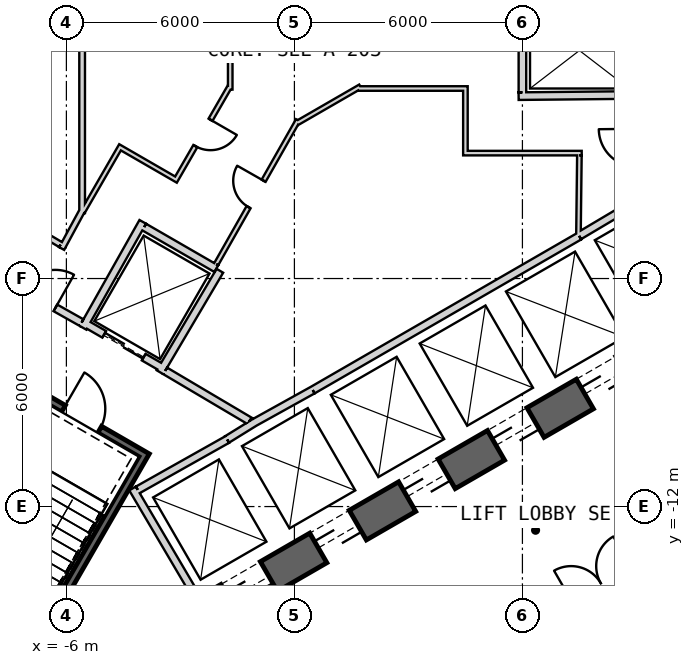
"""IFC4 building model, lengths in metres.
Left out: names, types, materials, properties, quantities, classifications, styles, units other than length and angle.
Written with IfcOpenShell. Run it as: python <this file> out.ifc"""

import sys

from ifc_helpers import new_model, si_unit, direction, frame, frame_2d, origin, place, context, subcontext, project, spatial, rectangle, extrude, element, fill, save


model = new_model("IFC4")
c1 = context("Model", 3, precision=1e-05, world=origin(), true_north=direction((0.0, 1.0)))
c2 = subcontext(c1, "Body", "Model", "MODEL_VIEW")
j1 = project(units=[si_unit("LENGTHUNIT", "METRE"), si_unit("PLANEANGLEUNIT", "RADIAN")], contexts=[c1])
p1 = place(None, origin())
s1 = spatial("IfcSite", under=j1, at=p1, CompositionType="ELEMENT")
p2 = place(p1, origin())
s2 = spatial("IfcBuilding", under=s1, at=p2, CompositionType="ELEMENT")
p3 = place(p2, origin())
s3 = spatial("IfcBuildingStorey", under=s2, at=p3, CompositionType="ELEMENT", Elevation=0.0)
p4 = place(p3, frame((-7.825, -17.97, 0.0), z_axis=(0.0, 0.0, 1.0), x_axis=(0.866028369851, 0.499994862586, 0.0)))
e1 = element("IfcWall", 1, at=p4, inside=s3, PredefinedType="SHEAR", context=c2, shape_type="SweptSolid", body=[
    extrude(rectangle(XDim=31.523, YDim=0.9, at=frame_2d((15.762, 0.0))), origin(), (0.0, 0.0, 1.0), 9.0),
])
p5 = place(p4, frame((7.062, 0.0, 0.0)))
e2 = element("IfcOpeningElement", 2, at=p5, cuts=e1, PredefinedType="OPENING", context=c2, shape_type="SweptSolid", body=[
    extrude(rectangle(XDim=1.2, YDim=2.4, at=frame_2d((0.6, 1.2))), frame((0.0, 0.46, 0.0), z_axis=(0.0, -1.0, 0.0), x_axis=(1.0, 0.0, 0.0)), (0.0, 0.0, 1.0), 0.92),
])
p6 = place(p4, frame((9.762, 0.0, 0.0)))
e3 = element("IfcOpeningElement", 3, at=p6, cuts=e1, PredefinedType="OPENING", context=c2, shape_type="SweptSolid", body=[
    extrude(rectangle(XDim=1.2, YDim=2.4, at=frame_2d((0.6, 1.2))), frame((0.0, 0.46, 0.0), z_axis=(0.0, -1.0, 0.0), x_axis=(1.0, 0.0, 0.0)), (0.0, 0.0, 1.0), 0.92),
])
p7 = place(p4, frame((12.462, 0.0, 0.0)))
e4 = element("IfcOpeningElement", 4, at=p7, cuts=e1, PredefinedType="OPENING", context=c2, shape_type="SweptSolid", body=[
    extrude(rectangle(XDim=1.2, YDim=2.4, at=frame_2d((0.6, 1.2))), frame((0.0, 0.46, 0.0), z_axis=(0.0, -1.0, 0.0), x_axis=(1.0, 0.0, 0.0)), (0.0, 0.0, 1.0), 0.92),
])
p8 = place(p4, frame((15.162, 0.0, 0.0)))
e5 = element("IfcOpeningElement", 5, at=p8, cuts=e1, PredefinedType="OPENING", context=c2, shape_type="SweptSolid", body=[
    extrude(rectangle(XDim=1.2, YDim=2.4, at=frame_2d((0.6, 1.2))), frame((0.0, 0.46, 0.0), z_axis=(0.0, -1.0, 0.0), x_axis=(1.0, 0.0, 0.0)), (0.0, 0.0, 1.0), 0.92),
])
p9 = place(p4, frame((17.862, 0.0, 0.0)))
e6 = element("IfcOpeningElement", 6, at=p9, cuts=e1, PredefinedType="OPENING", context=c2, shape_type="SweptSolid", body=[
    extrude(rectangle(XDim=1.2, YDim=2.4, at=frame_2d((0.6, 1.2))), frame((0.0, 0.46, 0.0), z_axis=(0.0, -1.0, 0.0), x_axis=(1.0, 0.0, 0.0)), (0.0, 0.0, 1.0), 0.92),
])
p10 = place(p4, frame((20.562, 0.0, 0.0)))
e7 = element("IfcOpeningElement", 7, at=p10, cuts=e1, PredefinedType="OPENING", context=c2, shape_type="SweptSolid", body=[
    extrude(rectangle(XDim=1.2, YDim=2.4, at=frame_2d((0.6, 1.2))), frame((0.0, 0.46, 0.0), z_axis=(0.0, -1.0, 0.0), x_axis=(1.0, 0.0, 0.0)), (0.0, 0.0, 1.0), 0.92),
])
p11 = place(p4, frame((26.712, 0.0, 0.0)))
e8 = element("IfcOpeningElement", 8, at=p11, cuts=e1, PredefinedType="OPENING", context=c2, shape_type="SweptSolid", body=[
    extrude(rectangle(XDim=1.2, YDim=2.4, at=frame_2d((0.6, 1.2))), frame((0.0, 0.46, 0.0), z_axis=(0.0, -1.0, 0.0), x_axis=(1.0, 0.0, 0.0)), (0.0, 0.0, 1.0), 0.92),
])
p12 = place(p4, frame((3.612, 0.0, 0.0)))
e9 = element("IfcOpeningElement", 9, at=p12, cuts=e1, PredefinedType="OPENING", context=c2, shape_type="SweptSolid", body=[
    extrude(rectangle(XDim=1.2, YDim=2.4, at=frame_2d((0.6, 1.2))), frame((0.0, 0.46, 0.0), z_axis=(0.0, -1.0, 0.0), x_axis=(1.0, 0.0, 0.0)), (0.0, 0.0, 1.0), 0.92),
])
p13 = place(p3, frame((0.483, -8.936, 0.0), z_axis=(0.0, 0.0, 1.0), x_axis=(0.866030989016, 0.499990325971, 0.0)))
e10 = element("IfcWall", 10, at=p13, inside=s3, PredefinedType="PLUMBINGWALL", context=c2, shape_type="SweptSolid", body=[
    extrude(rectangle(XDim=8.1, YDim=0.2, at=frame_2d((4.05, 0.0))), origin(), (0.0, 0.0, 1.0), 8.7),
])
p14 = place(p3, frame((7.493, -4.878, 0.0), z_axis=(0.0, 0.0, 1.0), x_axis=(0.859981807212, 0.510324691999, 0.0)))
e11 = element("IfcWall", 11, at=p14, inside=s3, PredefinedType="PLUMBINGWALL", context=c2, shape_type="SweptSolid", body=[
    extrude(rectangle(XDim=1.845, YDim=0.2, at=frame_2d((0.922, 0.0))), origin(), (0.0, 0.0, 1.0), 8.7),
])
p15 = place(p3, frame((-2.558, -14.409, 0.0), z_axis=(0.0, 0.0, 1.0), x_axis=(-0.507997497166, 0.861358544901, 0.0)))
e12 = element("IfcWall", 12, at=p15, inside=s3, PredefinedType="PLUMBINGWALL", context=c2, shape_type="SweptSolid", body=[
    extrude(rectangle(XDim=3.35, YDim=0.2, at=frame_2d((1.675, 0.0))), origin(), (0.0, 0.0, 1.0), 8.7),
])
p16 = place(p3, frame((-1.769, -10.237, 0.0), z_axis=(0.0, 0.0, 1.0), x_axis=(-0.871534483978, -0.490334215854, 0.0)))
e13 = element("IfcWall", 13, at=p16, inside=s3, PredefinedType="PLUMBINGWALL", context=c2, shape_type="SweptSolid", body=[
    extrude(rectangle(XDim=2.7, YDim=0.2, at=frame_2d((1.35, 0.0))), origin(), (0.0, 0.0, 1.0), 8.7),
])
p17 = place(p3, frame((-1.024, -9.771, 0.0), z_axis=(0.0, 0.0, 1.0), x_axis=(-0.850348075135, -0.526220629693, 0.0)))
e14 = element("IfcWall", 14, at=p17, inside=s3, PredefinedType="PLUMBINGWALL", context=c2, shape_type="SweptSolid", body=[
    extrude(rectangle(XDim=0.878, YDim=0.2, at=frame_2d((0.439, 0.0))), origin(), (0.0, 0.0, 1.0), 8.7),
])
p18 = place(p3, frame((-1.13, -9.831, 0.0), z_axis=(0.0, 0.0, 1.0), x_axis=(0.874269620932, 0.485440655401, 0.0)))
e15 = element("IfcWall", 15, at=p18, inside=s3, PredefinedType="PLUMBINGWALL", context=c2, shape_type="SweptSolid", body=[
    extrude(rectangle(XDim=1.845, YDim=0.2, at=frame_2d((0.922, 0.0))), origin(), (0.0, 0.0, 1.0), 8.7),
])
p19 = place(p3, frame((5.9, -1.201, 0.0), z_axis=(0.0, 0.0, 1.0), x_axis=(0.999950064753, 0.009993397809, 0.0)))
e16 = element("IfcWall", 16, at=p19, inside=s3, PredefinedType="PLUMBINGWALL", context=c2, shape_type="SweptSolid", body=[
    extrude(rectangle(XDim=3.2, YDim=0.2, at=frame_2d((1.6, 0.0))), origin(), (0.0, 0.0, 1.0), 8.7),
])
p20 = place(p3, frame((6.0, -1.1, 0.0), z_axis=(0.0, 0.0, 1.0), x_axis=(0.0, 1.0, 0.0)))
e17 = element("IfcWall", 17, at=p20, inside=s3, PredefinedType="PLUMBINGWALL", context=c2, shape_type="SweptSolid", body=[
    extrude(rectangle(XDim=2.205, YDim=0.2, at=frame_2d((1.102, 0.0))), origin(), (0.0, 0.0, 1.0), 8.7),
])
p21 = place(p3, frame((-3.905, -10.563, -0.4), z_axis=(0.0, 0.0, 1.0), x_axis=(-0.500012932018, -0.866017937352, 0.0)))
e18 = element("IfcWall", 18, at=p21, inside=s3, PredefinedType="SHEAR", context=c2, shape_type="SweptSolid", body=[
    extrude(rectangle(XDim=8.1, YDim=0.2, at=frame_2d((4.05, 0.0))), origin(), (0.0, 0.0, 1.0), 9.1),
])
p22 = place(p3, frame((-4.041, -10.599, -0.4), z_axis=(0.0, 0.0, 1.0), x_axis=(-0.866047807691, 0.499961193289, 0.0)))
e19 = element("IfcWall", 19, at=p22, inside=s3, PredefinedType="SHEAR", context=c2, shape_type="SweptSolid", body=[
    extrude(rectangle(XDim=3.6, YDim=0.2, at=frame_2d((1.8, 0.0))), origin(), (0.0, 0.0, 1.0), 9.1),
])
p23 = place(p22, frame((1.25, 0.0, 0.4)))
e20 = element("IfcOpeningElement", 20, at=p23, cuts=e19, PredefinedType="OPENING", context=c2, shape_type="SweptSolid", body=[
    extrude(rectangle(XDim=1.1, YDim=2.1, at=frame_2d((0.55, 1.05))), frame((0.0, 0.11, 0.0), z_axis=(0.0, -1.0, 0.0), x_axis=(1.0, 0.0, 0.0)), (0.0, 0.0, 1.0), 0.22),
])
p24 = place(p3, frame((-3.446, -8.368, 0.0), z_axis=(0.0, 0.0, 1.0), x_axis=(-0.866024647952, 0.500001309137, 0.0)))
e21 = element("IfcWall", 21, at=p24, inside=s3, PredefinedType="PLUMBINGWALL", context=c2, shape_type="SweptSolid", body=[
    extrude(rectangle(XDim=2.4, YDim=0.2, at=frame_2d((1.2, 0.0))), origin(), (0.0, 0.0, 1.0), 8.7),
])
p25 = place(p24, frame((0.6, 0.0, 0.0)))
e22 = element("IfcOpeningElement", 22, at=p25, cuts=e21, PredefinedType="OPENING", context=c2, shape_type="SweptSolid", body=[
    extrude(rectangle(XDim=1.2, YDim=2.4, at=frame_2d((0.6, 1.2))), frame((0.0, 0.11, 0.0), z_axis=(0.0, -1.0, 0.0), x_axis=(1.0, 0.0, 0.0)), (0.0, 0.0, 1.0), 0.22),
])
p26 = place(p3, frame((-1.961, -5.796, 0.0), z_axis=(0.0, 0.0, 1.0), x_axis=(-0.508647062354, -0.860975125052, 0.0)))
e23 = element("IfcWall", 23, at=p26, inside=s3, PredefinedType="PLUMBINGWALL", context=c2, shape_type="SweptSolid", body=[
    extrude(rectangle(XDim=3.1, YDim=0.2, at=frame_2d((1.55, 0.0))), origin(), (0.0, 0.0, 1.0), 8.7),
])
p27 = place(p3, frame((-3.99, -4.509, 0.0), z_axis=(0.0, 0.0, 1.0), x_axis=(-0.491358283181, -0.870957540612, 0.0)))
e24 = element("IfcWall", 24, at=p27, inside=s3, PredefinedType="PLUMBINGWALL", context=c2, shape_type="SweptSolid", body=[
    extrude(rectangle(XDim=3.2, YDim=0.2, at=frame_2d((1.6, 0.0))), origin(), (0.0, 0.0, 1.0), 8.7),
])
p28 = place(p3, frame((-3.953, -4.646, 0.0), z_axis=(0.0, 0.0, 1.0), x_axis=(0.866038900241, -0.499976622722, 0.0)))
e25 = element("IfcWall", 25, at=p28, inside=s3, PredefinedType="PLUMBINGWALL", context=c2, shape_type="SweptSolid", body=[
    extrude(rectangle(XDim=2.189, YDim=0.2, at=frame_2d((1.095, 0.0))), origin(), (0.0, 0.0, 1.0), 8.7),
])
p29 = place(p3, frame((-3.401, -8.43, 0.0), z_axis=(0.0, 0.0, 1.0), x_axis=(0.860615607571, -0.509255118781, 0.0)))
e26 = element("IfcWall", 26, at=p29, inside=s3, PredefinedType="PARTITIONING", context=c2, shape_type="SweptSolid", body=[
    extrude(rectangle(XDim=2.581, YDim=0.2, at=frame_2d((1.29, 0.0))), origin(), (0.0, 0.0, 1.0), 8.7),
])
p30 = place(p3, frame((-7.849, -5.894, 0.0), z_axis=(0.0, 0.0, 1.0), x_axis=(0.871363259478, -0.490638431059, 0.0)))
e27 = element("IfcWall", 27, at=p30, inside=s3, PredefinedType="PARTITIONING", context=c2, shape_type="SweptSolid", body=[
    extrude(rectangle(XDim=2.581, YDim=0.2, at=frame_2d((1.291, 0.0))), origin(), (0.0, 0.0, 1.0), 8.7),
])
p31 = place(p30, frame((0.791, 0.0, 0.0)))
e28 = element("IfcOpeningElement", 28, at=p31, cuts=e27, PredefinedType="OPENING", context=c2, shape_type="SweptSolid", body=[
    extrude(rectangle(XDim=1.0, YDim=2.1, at=frame_2d((0.5, 1.05))), frame((0.0, 0.11, 0.0), z_axis=(0.0, -1.0, 0.0), x_axis=(1.0, 0.0, 0.0)), (0.0, 0.0, 1.0), 0.22),
])
p32 = place(p3, frame((0.094, -1.836, 0.0), z_axis=(0.0, 0.0, 1.0), x_axis=(-0.494097972448, -0.869406230495, 0.0)))
e29 = element("IfcWall", 29, at=p32, inside=s3, PredefinedType="PARTITIONING", context=c2, shape_type="SweptSolid", body=[
    extrude(rectangle(XDim=4.357, YDim=0.12, at=frame_2d((2.179, 0.0))), origin(), (0.0, 0.0, 1.0), 8.7),
])
p33 = place(p32, frame((1.83, 0.0, 0.0)))
e30 = element("IfcOpeningElement", 30, at=p33, cuts=e29, PredefinedType="OPENING", context=c2, shape_type="SweptSolid", body=[
    extrude(rectangle(XDim=0.8, YDim=2.1, at=frame_2d((0.4, 1.05))), frame((0.0, 0.07, 0.0), z_axis=(0.0, -1.0, 0.0), x_axis=(1.0, 0.0, 0.0)), (0.0, 0.0, 1.0), 0.14),
])
p34 = place(p3, frame((1.735, -0.948, 0.0), z_axis=(0.0, 0.0, 1.0), x_axis=(-0.866021702275, -0.500006411147, 0.0)))
e31 = element("IfcWall", 31, at=p34, inside=s3, PredefinedType="PARTITIONING", context=c2, shape_type="SweptSolid", body=[
    extrude(rectangle(XDim=1.935, YDim=0.12, at=frame_2d((0.968, 0.0))), origin(), (0.0, 0.0, 1.0), 8.7),
])
p35 = place(p3, frame((4.56, -1.0, 0.0), z_axis=(0.0, 0.0, 1.0), x_axis=(-1.0, 0.0, 0.0)))
e32 = element("IfcWall", 32, at=p35, inside=s3, PredefinedType="PARTITIONING", context=c2, shape_type="SweptSolid", body=[
    extrude(rectangle(XDim=2.896, YDim=0.12, at=frame_2d((1.448, 0.0))), origin(), (0.0, 0.0, 1.0), 8.7),
])
p36 = place(p3, frame((4.5, -2.76, 0.0), z_axis=(0.0, 0.0, 1.0), x_axis=(0.0, 1.0, 0.0)))
e33 = element("IfcWall", 33, at=p36, inside=s3, PredefinedType="PARTITIONING", context=c2, shape_type="SweptSolid", body=[
    extrude(rectangle(XDim=1.7, YDim=0.12, at=frame_2d((0.85, 0.0))), origin(), (0.0, 0.0, 1.0), 8.7),
])
p37 = place(p3, frame((7.56, -2.7, 0.0), z_axis=(0.0, 0.0, 1.0), x_axis=(-1.0, 0.0, 0.0)))
e34 = element("IfcWall", 34, at=p37, inside=s3, PredefinedType="PARTITIONING", context=c2, shape_type="SweptSolid", body=[
    extrude(rectangle(XDim=3.0, YDim=0.12, at=frame_2d((1.5, 0.0))), origin(), (0.0, 0.0, 1.0), 8.7),
])
p38 = place(p3, frame((7.475, -4.865, 0.0), z_axis=(0.0, 0.0, 1.0), x_axis=(0.011716133148, 0.999931363757, 0.0)))
e35 = element("IfcWall", 35, at=p38, inside=s3, PredefinedType="PARTITIONING", context=c2, shape_type="SweptSolid", body=[
    extrude(rectangle(XDim=2.105, YDim=0.12, at=frame_2d((1.052, 0.0))), origin(), (0.0, 0.0, 1.0), 8.7),
])
p39 = place(p3, frame((-5.586, -4.275, 0.0), z_axis=(0.0, 0.0, 1.0), x_axis=(0.0, 1.0, 0.0)))
e36 = element("IfcWall", 36, at=p39, inside=s3, PredefinedType="PLUMBINGWALL", context=c2, shape_type="SweptSolid", body=[
    extrude(rectangle(XDim=8.549, YDim=0.15, at=frame_2d((4.275, 0.0))), origin(), (0.0, 0.0, 1.0), 8.7),
])
p40 = place(p3, frame((-6.124, -5.211, 0.0), z_axis=(0.0, 0.0, 1.0), x_axis=(0.476228984866, 0.879321303036, 0.0)))
e37 = element("IfcWall", 37, at=p40, inside=s3, PredefinedType="PLUMBINGWALL", context=c2, shape_type="SweptSolid", body=[
    extrude(rectangle(XDim=1.162, YDim=0.15, at=frame_2d((0.581, 0.0))), origin(), (0.0, 0.0, 1.0), 8.7),
])
p41 = place(p3, frame((-7.95, -4.041, 0.0), z_axis=(0.0, 0.0, 1.0), x_axis=(0.860090281069, -0.510141851263, 0.0)))
e38 = element("IfcWall", 38, at=p41, inside=s3, PredefinedType="PLUMBINGWALL", context=c2, shape_type="SweptSolid", body=[
    extrude(rectangle(XDim=2.089, YDim=0.15, at=frame_2d((1.045, 0.0))), origin(), (0.0, 0.0, 1.0), 8.7),
])
p42 = place(p3, frame((-1.689, -1.029, 0.0), z_axis=(0.0, 0.0, 1.0), x_axis=(0.0, 1.0, 0.0)))
e39 = element("IfcWall", 39, at=p42, inside=s3, PredefinedType="PARTITIONING", context=c2, shape_type="SweptSolid", body=[
    extrude(rectangle(XDim=1.935, YDim=0.12, at=frame_2d((0.968, 0.0))), origin(), (0.0, 0.0, 1.0), 8.7),
])
p43 = place(p3, frame((-3.146, -3.449, 0.0), z_axis=(0.0, 0.0, 1.0), x_axis=(0.500028961621, 0.866008682139, 0.0)))
e40 = element("IfcWall", 40, at=p43, inside=s3, PredefinedType="PARTITIONING", context=c2, shape_type="SweptSolid", body=[
    extrude(rectangle(XDim=2.896, YDim=0.12, at=frame_2d((1.448, 0.0))), origin(), (0.0, 0.0, 1.0), 8.7),
])
p44 = place(p43, frame((1.078, 0.0, 0.0)))
e41 = element("IfcOpeningElement", 41, at=p44, cuts=e40, PredefinedType="OPENING", context=c2, shape_type="SweptSolid", body=[
    extrude(rectangle(XDim=0.8, YDim=2.1, at=frame_2d((0.4, 1.05))), frame((0.0, 0.07, 0.0), z_axis=(0.0, -1.0, 0.0), x_axis=(1.0, 0.0, 0.0)), (0.0, 0.0, 1.0), 0.14),
])
p45 = place(p3, frame((-4.64, -2.517, 0.0), z_axis=(0.0, 0.0, 1.0), x_axis=(0.865989465428, -0.500062241894, 0.0)))
e42 = element("IfcWall", 42, at=p45, inside=s3, PredefinedType="PARTITIONING", context=c2, shape_type="SweptSolid", body=[
    extrude(rectangle(XDim=1.7, YDim=0.12, at=frame_2d((0.85, 0.0))), origin(), (0.0, 0.0, 1.0), 8.7),
])
p46 = place(p3, frame((-5.571, -4.249, 0.0), z_axis=(0.0, 0.0, 1.0), x_axis=(0.500081145431, 0.865978549379, 0.0)))
e43 = element("IfcWall", 43, at=p46, inside=s3, PredefinedType="PARTITIONING", context=c2, shape_type="SweptSolid", body=[
    extrude(rectangle(XDim=1.905, YDim=0.12, at=frame_2d((0.953, 0.0))), origin(), (0.0, 0.0, 1.0), 8.7),
])
p47 = place(p3, frame((-4.276, -21.14, 0.0), z_axis=(0.0, 0.0, 1.0), x_axis=(0.866026219638, 0.499998586897, 0.0)))
e44 = element("IfcWall", 44, at=p47, inside=s3, PredefinedType="PARTITIONING", context=c2, shape_type="SweptSolid", body=[
    extrude(rectangle(XDim=28.547, YDim=0.12, at=frame_2d((14.273, 0.0))), origin(), (0.0, 0.0, 1.0), 8.7),
])
p48 = place(p47, frame((20.947, 0.0, 0.0)))
e45 = element("IfcOpeningElement", 45, at=p48, cuts=e44, PredefinedType="OPENING", context=c2, shape_type="SweptSolid", body=[
    extrude(rectangle(XDim=1.8, YDim=2.1, at=frame_2d((0.9, 1.05))), frame((0.0, 0.07, 0.0), z_axis=(0.0, -1.0, 0.0), x_axis=(1.0, 0.0, 0.0)), (0.0, 0.0, 1.0), 0.14),
])
p49 = place(p47, frame((13.347, 0.0, 0.0)))
e46 = element("IfcOpeningElement", 46, at=p49, cuts=e44, PredefinedType="OPENING", context=c2, shape_type="SweptSolid", body=[
    extrude(rectangle(XDim=1.8, YDim=2.1, at=frame_2d((0.9, 1.05))), frame((0.0, 0.07, 0.0), z_axis=(0.0, -1.0, 0.0), x_axis=(1.0, 0.0, 0.0)), (0.0, 0.0, 1.0), 0.14),
])
p50 = place(p47, frame((5.747, 0.0, 0.0)))
e47 = element("IfcOpeningElement", 47, at=p50, cuts=e44, PredefinedType="OPENING", context=c2, shape_type="SweptSolid", body=[
    extrude(rectangle(XDim=1.8, YDim=2.1, at=frame_2d((0.9, 1.05))), frame((0.0, 0.07, 0.0), z_axis=(0.0, -1.0, 0.0), x_axis=(1.0, 0.0, 0.0)), (0.0, 0.0, 1.0), 0.14),
])
p51 = place(p23, origin())
e48 = element("IfcDoor", 48, at=p51, inside=s3, OperationType="SINGLE_SWING_RIGHT", PredefinedType="USERDEFINED", context=c2, shape_type="SweptSolid", body=[
    extrude(rectangle(XDim=1.1, YDim=2.1, at=frame_2d((0.55, 1.05))), frame((0.0, 0.025, 0.0), z_axis=(0.0, -1.0, 0.0), x_axis=(1.0, 0.0, 0.0)), (0.0, 0.0, 1.0), 0.05),
])
fill(e20, e48)
p52 = place(p31, origin())
e49 = element("IfcDoor", 49, at=p52, inside=s3, OperationType="SINGLE_SWING_RIGHT", PredefinedType="USERDEFINED", context=c2, shape_type="SweptSolid", body=[
    extrude(rectangle(XDim=1.0, YDim=2.1, at=frame_2d((0.5, 1.05))), frame((0.0, 0.025, 0.0), z_axis=(0.0, -1.0, 0.0), x_axis=(1.0, 0.0, 0.0)), (0.0, 0.0, 1.0), 0.05),
])
fill(e28, e49)
p53 = place(p25, origin())
e50 = element("IfcDoor", 50, at=p53, inside=s3, OperationType="SLIDING_TO_LEFT", PredefinedType="USERDEFINED", context=c2, shape_type="SweptSolid", body=[
    extrude(rectangle(XDim=1.2, YDim=2.4, at=frame_2d((0.6, 1.2))), frame((0.0, 0.025, 0.0), z_axis=(0.0, -1.0, 0.0), x_axis=(1.0, 0.0, 0.0)), (0.0, 0.0, 1.0), 0.05),
])
fill(e22, e50)
p54 = place(p33, origin())
e51 = element("IfcDoor", 51, at=p54, inside=s3, OperationType="SINGLE_SWING_LEFT", PredefinedType="USERDEFINED", context=c2, shape_type="SweptSolid", body=[
    extrude(rectangle(XDim=0.8, YDim=2.1, at=frame_2d((0.4, 1.05))), frame((0.0, 0.025, 0.0), z_axis=(0.0, -1.0, 0.0), x_axis=(1.0, 0.0, 0.0)), (0.0, 0.0, 1.0), 0.05),
])
fill(e30, e51)
p55 = place(p44, origin())
e52 = element("IfcDoor", 52, at=p55, inside=s3, OperationType="SINGLE_SWING_RIGHT", PredefinedType="USERDEFINED", context=c2, shape_type="SweptSolid", body=[
    extrude(rectangle(XDim=0.8, YDim=2.1, at=frame_2d((0.4, 1.05))), frame((0.0, 0.025, 0.0), z_axis=(0.0, -1.0, 0.0), x_axis=(1.0, 0.0, 0.0)), (0.0, 0.0, 1.0), 0.05),
])
fill(e41, e52)
p56 = place(p49, origin())
e53 = element("IfcDoor", 53, at=p56, inside=s3, OperationType="DOUBLE_DOOR_SINGLE_SWING", PredefinedType="NOTDEFINED", context=c2, shape_type="SweptSolid", body=[
    extrude(rectangle(XDim=1.8, YDim=2.1, at=frame_2d((0.9, 1.05))), frame((0.0, 0.025, 0.0), z_axis=(0.0, -1.0, 0.0), x_axis=(1.0, 0.0, 0.0)), (0.0, 0.0, 1.0), 0.05),
])
fill(e46, e53)
p57 = place(p5, origin())
e54 = element("IfcDoor", 54, at=p57, inside=s3, OperationType="SLIDING_TO_LEFT", PredefinedType="USERDEFINED", context=c2, shape_type="SweptSolid", body=[
    extrude(rectangle(XDim=1.2, YDim=2.4, at=frame_2d((0.6, 1.2))), frame((0.0, 0.025, 0.0), z_axis=(0.0, -1.0, 0.0), x_axis=(1.0, 0.0, 0.0)), (0.0, 0.0, 1.0), 0.05),
])
fill(e2, e54)
p58 = place(p6, origin())
e55 = element("IfcDoor", 55, at=p58, inside=s3, OperationType="SLIDING_TO_LEFT", PredefinedType="USERDEFINED", context=c2, shape_type="SweptSolid", body=[
    extrude(rectangle(XDim=1.2, YDim=2.4, at=frame_2d((0.6, 1.2))), frame((0.0, 0.025, 0.0), z_axis=(0.0, -1.0, 0.0), x_axis=(1.0, 0.0, 0.0)), (0.0, 0.0, 1.0), 0.05),
])
fill(e3, e55)
p59 = place(p7, origin())
e56 = element("IfcDoor", 56, at=p59, inside=s3, OperationType="SLIDING_TO_LEFT", PredefinedType="USERDEFINED", context=c2, shape_type="SweptSolid", body=[
    extrude(rectangle(XDim=1.2, YDim=2.4, at=frame_2d((0.6, 1.2))), frame((0.0, 0.025, 0.0), z_axis=(0.0, -1.0, 0.0), x_axis=(1.0, 0.0, 0.0)), (0.0, 0.0, 1.0), 0.05),
])
fill(e4, e56)
p60 = place(p8, origin())
e57 = element("IfcDoor", 57, at=p60, inside=s3, OperationType="SLIDING_TO_LEFT", PredefinedType="USERDEFINED", context=c2, shape_type="SweptSolid", body=[
    extrude(rectangle(XDim=1.2, YDim=2.4, at=frame_2d((0.6, 1.2))), frame((0.0, 0.025, 0.0), z_axis=(0.0, -1.0, 0.0), x_axis=(1.0, 0.0, 0.0)), (0.0, 0.0, 1.0), 0.05),
])
fill(e5, e57)
p61 = place(p9, origin())
e58 = element("IfcDoor", 58, at=p61, inside=s3, OperationType="SLIDING_TO_LEFT", PredefinedType="USERDEFINED", context=c2, shape_type="SweptSolid", body=[
    extrude(rectangle(XDim=1.2, YDim=2.4, at=frame_2d((0.6, 1.2))), frame((0.0, 0.025, 0.0), z_axis=(0.0, -1.0, 0.0), x_axis=(1.0, 0.0, 0.0)), (0.0, 0.0, 1.0), 0.05),
])
fill(e6, e58)
save(model, sys.argv[1])
